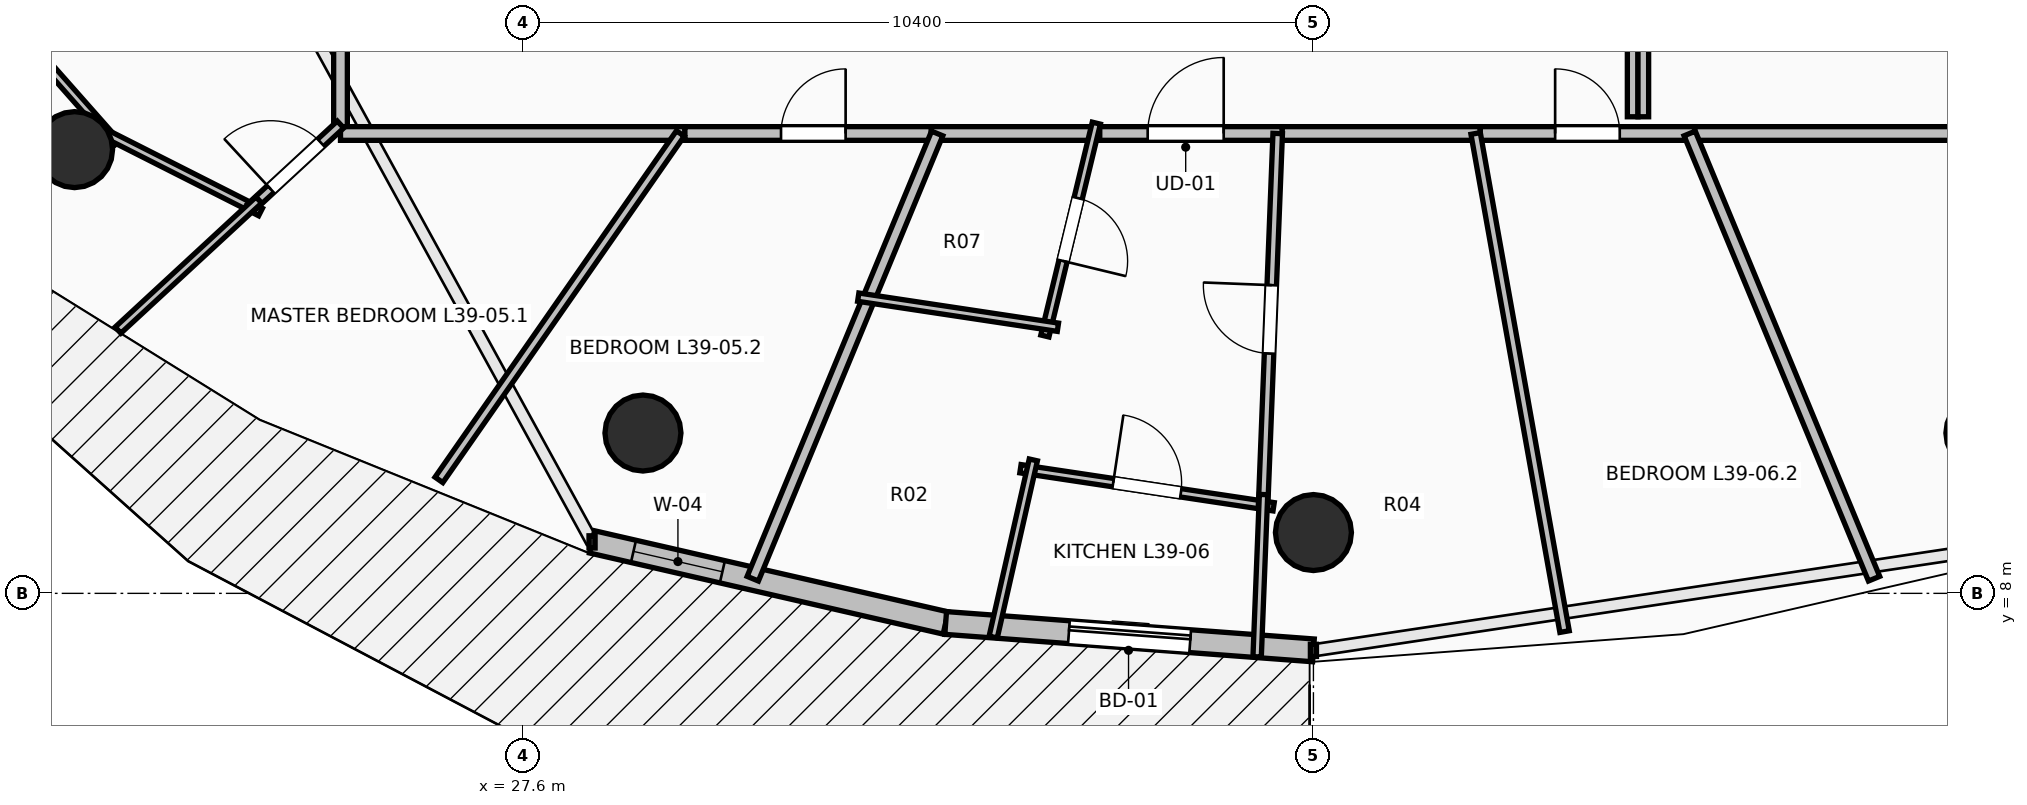
"""IFC4 building model, lengths in metres.
Left out: names, types, materials, properties, quantities, classifications, styles, units other than length and angle.
Written with IfcOpenShell. Run it as: python <this file> out.ifc"""

import sys

from ifc_helpers import new_model, si_unit, direction, frame, frame_2d, origin, origin_2d, place, context, subcontext, project, spatial, rectangle, circle, extrude, element, fill, save


model = new_model("IFC4")
c1 = context("Model", 3, precision=1e-05, world=origin(), true_north=direction((0.0, 1.0)))
c2 = subcontext(c1, "Body", "Model", "MODEL_VIEW")
j1 = project(units=[si_unit("LENGTHUNIT", "METRE"), si_unit("PLANEANGLEUNIT", "RADIAN")], contexts=[c1])
p1 = place(None, origin())
s1 = spatial("IfcSite", under=j1, at=p1, CompositionType="ELEMENT")
p2 = place(p1, origin())
s2 = spatial("IfcBuilding", under=s1, at=p2, CompositionType="ELEMENT")
p3 = place(p2, frame((0.0, 0.0, 146.6)))
s3 = spatial("IfcBuildingStorey", under=s2, at=p3, CompositionType="ELEMENT", Elevation=146.6)
for number, where, z_axis, x_axis in (
    (1, (21.701, 13.838, 0.0), (0.0, 0.0, 1.0), (-0.707, -0.707, 0.0)),
    (2, (29.179, 10.109, 0.0), (0.0, 0.0, 1.0), (-0.383, -0.924, 0.0)),
    (3, (38.0, 8.8, 0.0), (0.0, 0.0, 1.0), (0.0, -1.0, 0.0)),
    (4, (46.821, 10.109, 0.0), (0.0, 0.0, 1.0), (0.383, -0.924, 0.0)),
):
    element("IfcColumn", number, at=place(p3, frame(where, z_axis=z_axis, x_axis=x_axis)), inside=s3, PredefinedType="COLUMN", context=c2, shape_type="SweptSolid", body=[
        extrude(circle(Radius=0.5, at=origin_2d()), origin(), (0.0, 0.0, 1.0), 3.5),
    ])
p4 = place(p3, frame((28.51, 8.677, 0.0), z_axis=(0.0, 0.0, 1.0), x_axis=(0.974698897188, -0.223521944832, 0.0)))
e5 = element("IfcWall", 5, at=p4, inside=s3, PredefinedType="STANDARD", context=c2, shape_type="SweptSolid", body=[
    extrude(rectangle(XDim=4.773, YDim=0.3, at=frame_2d((2.387, 0.0))), origin(), (0.0, 0.0, 1.0), 3.24),
])
p5 = place(p4, frame((0.559, 0.0, 0.85)))
e6 = element("IfcOpeningElement", 6, at=p5, cuts=e5, PredefinedType="OPENING", context=c2, shape_type="SweptSolid", body=[
    extrude(rectangle(XDim=1.2, YDim=1.95, at=frame_2d((0.6, 0.975))), frame((0.0, 0.165, 0.0), z_axis=(0.0, -1.0, 0.0), x_axis=(1.0, 0.0, 0.0)), (0.0, 0.0, 1.0), 0.33),
])
p6 = place(p3, frame((33.162, 7.61, 0.0), z_axis=(0.0, 0.0, 1.0), x_axis=(0.997237740067, -0.074275768499, 0.0)))
e7 = element("IfcWall", 7, at=p6, inside=s3, PredefinedType="STANDARD", context=c2, shape_type="SweptSolid", body=[
    extrude(rectangle(XDim=4.852, YDim=0.3, at=frame_2d((2.426, 0.0))), origin(), (0.0, 0.0, 1.0), 3.24),
])
p7 = place(p6, frame((1.626, 0.0, 0.0)))
e8 = element("IfcOpeningElement", 8, at=p7, cuts=e7, PredefinedType="OPENING", context=c2, shape_type="SweptSolid", body=[
    extrude(rectangle(XDim=1.6, YDim=2.3, at=frame_2d((0.8, 1.15))), frame((0.0, 0.165, 0.0), z_axis=(0.0, -1.0, 0.0), x_axis=(1.0, 0.0, 0.0)), (0.0, 0.0, 1.0), 0.33),
])
p8 = place(p3, frame((25.2, 18.244, 0.0), z_axis=(0.0, 0.0, 1.0), x_axis=(0.0, -1.0, 0.0)))
e9 = element("IfcWall", 9, at=p8, inside=s3, PredefinedType="PARTITIONING", context=c2, shape_type="SweptSolid", body=[
    extrude(rectangle(XDim=4.158, YDim=0.18, at=frame_2d((2.079, 0.0))), origin(), (0.0, 0.0, 1.0), 2.432),
])
p9 = place(p8, frame((1.579, 0.0, 0.0)))
e10 = element("IfcOpeningElement", 10, at=p9, cuts=e9, PredefinedType="OPENING", context=c2, shape_type="SweptSolid", body=[
    extrude(rectangle(XDim=1.0, YDim=2.15, at=frame_2d((0.5, 1.075))), frame((0.0, 0.105, 0.0), z_axis=(0.0, -1.0, 0.0), x_axis=(1.0, 0.0, 0.0)), (0.0, 0.0, 1.0), 0.21),
])
p10 = place(p3, frame((25.2, 14.05, 0.0), z_axis=(0.0, 0.0, 1.0), x_axis=(1.0, 0.0, 0.0)))
e11 = element("IfcWall", 11, at=p10, inside=s3, PredefinedType="PARTITIONING", context=c2, shape_type="SweptSolid", body=[
    extrude(rectangle(XDim=4.531, YDim=0.18, at=frame_2d((2.266, 0.0))), origin(), (0.0, 0.0, 1.0), 2.432),
])
p11 = place(p3, frame((29.731, 14.05, 0.0), z_axis=(0.0, 0.0, 1.0), x_axis=(1.0, 0.0, 0.0)))
e12 = element("IfcWall", 12, at=p11, inside=s3, PredefinedType="PARTITIONING", context=c2, shape_type="SweptSolid", body=[
    extrude(rectangle(XDim=3.379, YDim=0.18, at=frame_2d((1.689, 0.0))), origin(), (0.0, 0.0, 1.0), 2.972),
])
p12 = place(p11, frame((1.264, 0.0, 0.0)))
e13 = element("IfcOpeningElement", 13, at=p12, cuts=e12, PredefinedType="OPENING", context=c2, shape_type="SweptSolid", body=[
    extrude(rectangle(XDim=0.85, YDim=2.1, at=frame_2d((0.425, 1.05))), frame((0.0, 0.105, 0.0), z_axis=(0.0, -1.0, 0.0), x_axis=(1.0, 0.0, 0.0)), (0.0, 0.0, 1.0), 0.21),
])
p13 = place(p3, frame((35.049, 14.05, 0.0), z_axis=(0.0, 0.0, 1.0), x_axis=(1.0, 0.0, 0.0)))
e14 = element("IfcWall", 14, at=p13, inside=s3, PredefinedType="PARTITIONING", context=c2, shape_type="SweptSolid", body=[
    extrude(rectangle(XDim=2.541, YDim=0.18, at=frame_2d((1.271, 0.0))), origin(), (0.0, 0.0, 1.0), 2.972),
])
p14 = place(p13, frame((0.771, 0.0, 0.0)))
e15 = element("IfcOpeningElement", 15, at=p14, cuts=e14, PredefinedType="OPENING", context=c2, shape_type="SweptSolid", body=[
    extrude(rectangle(XDim=1.0, YDim=2.15, at=frame_2d((0.5, 1.075))), frame((0.0, 0.105, 0.0), z_axis=(0.0, -1.0, 0.0), x_axis=(1.0, 0.0, 0.0)), (0.0, 0.0, 1.0), 0.21),
])
p15 = place(p3, frame((32.97, 14.05, 0.0), z_axis=(0.0, 0.0, 1.0), x_axis=(1.0, 0.0, 0.0)))
e16 = element("IfcWall", 16, at=p15, inside=s3, PredefinedType="PARTITIONING", context=c2, shape_type="SweptSolid", body=[
    extrude(rectangle(XDim=2.219, YDim=0.18, at=frame_2d((1.109, 0.0))), origin(), (0.0, 0.0, 1.0), 2.972),
])
p16 = place(p3, frame((37.59, 14.05, 0.0), z_axis=(0.0, 0.0, 1.0), x_axis=(1.0, 0.0, 0.0)))
e17 = element("IfcWall", 17, at=p16, inside=s3, PredefinedType="PARTITIONING", context=c2, shape_type="SweptSolid", body=[
    extrude(rectangle(XDim=2.605, YDim=0.18, at=frame_2d((1.302, 0.0))), origin(), (0.0, 0.0, 1.0), 2.972),
])
p17 = place(p3, frame((40.195, 14.05, 0.0), z_axis=(0.0, 0.0, 1.0), x_axis=(1.0, 0.0, 0.0)))
e18 = element("IfcWall", 18, at=p17, inside=s3, PredefinedType="PARTITIONING", context=c2, shape_type="SweptSolid", body=[
    extrude(rectangle(XDim=2.82, YDim=0.18, at=frame_2d((1.41, 0.0))), origin(), (0.0, 0.0, 1.0), 2.972),
])
p18 = place(p17, frame((0.985, 0.0, 0.0)))
e19 = element("IfcOpeningElement", 19, at=p18, cuts=e18, PredefinedType="OPENING", context=c2, shape_type="SweptSolid", body=[
    extrude(rectangle(XDim=0.85, YDim=2.1, at=frame_2d((0.425, 1.05))), frame((0.0, 0.105, 0.0), z_axis=(0.0, -1.0, 0.0), x_axis=(1.0, 0.0, 0.0)), (0.0, 0.0, 1.0), 0.21),
])
p19 = place(p3, frame((43.015, 14.05, 0.0), z_axis=(0.0, 0.0, 1.0), x_axis=(1.0, 0.0, 0.0)))
e20 = element("IfcWall", 20, at=p19, inside=s3, PredefinedType="PARTITIONING", context=c2, shape_type="SweptSolid", body=[
    extrude(rectangle(XDim=7.785, YDim=0.18, at=frame_2d((3.893, 0.0))), origin(), (0.0, 0.0, 1.0), 2.432),
])
p20 = place(p19, frame((3.393, 0.0, 0.0)))
e21 = element("IfcOpeningElement", 21, at=p20, cuts=e20, PredefinedType="OPENING", context=c2, shape_type="SweptSolid", body=[
    extrude(rectangle(XDim=1.0, YDim=2.15, at=frame_2d((0.5, 1.075))), frame((0.0, 0.105, 0.0), z_axis=(0.0, -1.0, 0.0), x_axis=(1.0, 0.0, 0.0)), (0.0, 0.0, 1.0), 0.21),
])
p21 = place(p3, frame((20.935, 15.409, 0.0), z_axis=(0.0, 0.0, 1.0), x_axis=(0.66216897397, -0.749354555542, 0.0)))
e22 = element("IfcWall", 22, at=p21, inside=s3, PredefinedType="PARTITIONING", context=c2, shape_type="SweptSolid", body=[
    extrude(rectangle(XDim=1.991, YDim=0.11, at=frame_2d((0.996, 0.0))), origin(), (0.0, 0.0, 1.0), 2.432),
])
p22 = place(p3, frame((22.036, 14.085, 0.0), z_axis=(0.0, 0.0, 1.0), x_axis=(0.892312874209, -0.451417472548, 0.0)))
e23 = element("IfcWall", 23, at=p22, inside=s3, PredefinedType="PARTITIONING", context=c2, shape_type="SweptSolid", body=[
    extrude(rectangle(XDim=2.367, YDim=0.11, at=frame_2d((1.183, 0.0))), origin(), (0.0, 0.0, 1.0), 2.432),
])
p23 = place(p3, frame((24.023, 13.08, 0.0), z_axis=(0.0, 0.0, 1.0), x_axis=(0.734359451791, 0.678760779336, 0.0)))
e24 = element("IfcWall", 24, at=p23, inside=s3, PredefinedType="PARTITIONING", context=c2, shape_type="SweptSolid", body=[
    extrude(rectangle(XDim=1.603, YDim=0.125, at=frame_2d((0.801, 0.0))), origin(), (0.0, 0.0, 1.0), 2.922),
])
p24 = place(p23, frame((0.351, 0.0, 0.0)))
e25 = element("IfcOpeningElement", 25, at=p24, cuts=e24, PredefinedType="OPENING", context=c2, shape_type="SweptSolid", body=[
    extrude(rectangle(XDim=0.9, YDim=2.1, at=frame_2d((0.45, 1.05))), frame((0.0, 0.077, 0.0), z_axis=(0.0, -1.0, 0.0), x_axis=(1.0, 0.0, 0.0)), (0.0, 0.0, 1.0), 0.155),
])
p25 = place(p3, frame((22.273, 11.463, 0.0), z_axis=(0.0, 0.0, 1.0), x_axis=(0.73438401738, 0.678734200565, 0.0)))
e26 = element("IfcWall", 26, at=p25, inside=s3, PredefinedType="PARTITIONING", context=c2, shape_type="SweptSolid", body=[
    extrude(rectangle(XDim=2.522, YDim=0.11, at=frame_2d((1.261, 0.0))), origin(), (0.0, 0.0, 1.0), 2.728),
])
p26 = place(p3, frame((26.495, 9.493, 0.0), z_axis=(0.0, 0.0, 1.0), x_axis=(0.571744252323, 0.820431904509, 0.0)))
e27 = element("IfcWall", 27, at=p26, inside=s3, PredefinedType="PARTITIONING", context=c2, shape_type="SweptSolid", body=[
    extrude(rectangle(XDim=5.554, YDim=0.125, at=frame_2d((2.777, 0.0))), origin(), (0.0, 0.0, 1.0), 2.432),
])
p27 = place(p3, frame((30.624, 8.193, 0.0), z_axis=(0.0, 0.0, 1.0), x_axis=(0.382683979298, 0.923879305964, 0.0)))
e28 = element("IfcWall", 28, at=p27, inside=s3, PredefinedType="PARTITIONING", context=c2, shape_type="SweptSolid", body=[
    extrude(rectangle(XDim=6.34, YDim=0.16, at=frame_2d((3.17, 0.0))), origin(), (0.0, 0.0, 1.0), 2.728),
])
p28 = place(p3, frame((35.144, 14.186, 0.0), z_axis=(0.0, 0.0, 1.0), x_axis=(-0.234930486238, -0.972012174119, 0.0)))
e29 = element("IfcWall", 29, at=p28, inside=s3, PredefinedType="PARTITIONING", context=c2, shape_type="SweptSolid", body=[
    extrude(rectangle(XDim=2.881, YDim=0.11, at=frame_2d((1.44, 0.0))), origin(), (0.0, 0.0, 1.0), 2.922),
])
p29 = place(p28, frame((1.015, 0.0, 0.0)))
e30 = element("IfcOpeningElement", 30, at=p29, cuts=e29, PredefinedType="OPENING", context=c2, shape_type="SweptSolid", body=[
    extrude(rectangle(XDim=0.85, YDim=2.1, at=frame_2d((0.425, 1.05))), frame((0.0, 0.07, 0.0), z_axis=(0.0, -1.0, 0.0), x_axis=(1.0, 0.0, 0.0)), (0.0, 0.0, 1.0), 0.14),
])
p30 = place(p3, frame((34.638, 11.501, 0.0), z_axis=(0.0, 0.0, 1.0), x_axis=(-0.988839741605, 0.148983104484, 0.0)))
e31 = element("IfcWall", 31, at=p30, inside=s3, PredefinedType="PARTITIONING", context=c2, shape_type="SweptSolid", body=[
    extrude(rectangle(XDim=2.656, YDim=0.11, at=frame_2d((1.328, 0.0))), origin(), (0.0, 0.0, 1.0), 3.24),
])
p31 = place(p3, frame((34.146, 9.64, 0.0), z_axis=(0.0, 0.0, 1.0), x_axis=(0.988887919082, -0.148662986296, 0.0)))
e32 = element("IfcWall", 32, at=p31, inside=s3, PredefinedType="PARTITIONING", context=c2, shape_type="SweptSolid", body=[
    extrude(rectangle(XDim=3.368, YDim=0.11, at=frame_2d((1.684, 0.0))), origin(), (0.0, 0.0, 1.0), 3.24),
])
p32 = place(p31, frame((1.234, 0.0, 0.0)))
e33 = element("IfcOpeningElement", 33, at=p32, cuts=e32, PredefinedType="OPENING", context=c2, shape_type="SweptSolid", body=[
    extrude(rectangle(XDim=0.9, YDim=2.1, at=frame_2d((0.45, 1.05))), frame((0.0, 0.07, 0.0), z_axis=(0.0, -1.0, 0.0), x_axis=(1.0, 0.0, 0.0)), (0.0, 0.0, 1.0), 0.14),
])
p33 = place(p3, frame((33.787, 7.426, 0.0), z_axis=(0.0, 0.0, 1.0), x_axis=(0.220932027223, 0.975289208054, 0.0)))
e34 = element("IfcWall", 34, at=p33, inside=s3, PredefinedType="PARTITIONING", context=c2, shape_type="SweptSolid", body=[
    extrude(rectangle(XDim=2.389, YDim=0.11, at=frame_2d((1.195, 0.0))), origin(), (0.0, 0.0, 1.0), 2.728),
])
p34 = place(p3, frame((37.338, 9.16, 0.0), z_axis=(0.0, 0.0, 1.0), x_axis=(0.039260769946, 0.99922899875, 0.0)))
e35 = element("IfcWall", 35, at=p34, inside=s3, PredefinedType="PARTITIONING", context=c2, shape_type="SweptSolid", body=[
    extrude(rectangle(XDim=4.894, YDim=0.125, at=frame_2d((2.447, 0.0))), origin(), (0.0, 0.0, 1.0), 2.922),
])
p35 = place(p34, frame((1.997, 0.0, 0.0)))
e36 = element("IfcOpeningElement", 36, at=p35, cuts=e35, PredefinedType="OPENING", context=c2, shape_type="SweptSolid", body=[
    extrude(rectangle(XDim=0.9, YDim=2.1, at=frame_2d((0.45, 1.05))), frame((0.0, 0.077, 0.0), z_axis=(0.0, -1.0, 0.0), x_axis=(1.0, 0.0, 0.0)), (0.0, 0.0, 1.0), 0.155),
])
p36 = place(p3, frame((37.26, 7.165, 0.0), z_axis=(0.0, 0.0, 1.0), x_axis=(0.039310852952, 0.999227029679, 0.0)))
e37 = element("IfcWall", 37, at=p36, inside=s3, PredefinedType="PARTITIONING", context=c2, shape_type="SweptSolid", body=[
    extrude(rectangle(XDim=2.136, YDim=0.11, at=frame_2d((1.068, 0.0))), origin(), (0.0, 0.0, 1.0), 2.728),
])
p37 = place(p3, frame((41.304, 7.497, 0.0), z_axis=(0.0, 0.0, 1.0), x_axis=(-0.175753825846, 0.984434148484, 0.0)))
e38 = element("IfcWall", 38, at=p37, inside=s3, PredefinedType="PARTITIONING", context=c2, shape_type="SweptSolid", body=[
    extrude(rectangle(XDim=6.656, YDim=0.125, at=frame_2d((3.328, 0.0))), origin(), (0.0, 0.0, 1.0), 2.432),
])
p38 = place(p3, frame((45.376, 8.193, 0.0), z_axis=(0.0, 0.0, 1.0), x_axis=(-0.382683979298, 0.923879305964, 0.0)))
e39 = element("IfcWall", 39, at=p38, inside=s3, PredefinedType="PARTITIONING", context=c2, shape_type="SweptSolid", body=[
    extrude(rectangle(XDim=6.34, YDim=0.16, at=frame_2d((3.17, 0.0))), origin(), (0.0, 0.0, 1.0), 2.432),
])
for number, where, z_axis, x_axis in (
    (40, (42.2, 16.1, 0.0), (0.0, 0.0, 1.0), (0.0, -1.0, 0.0)),
    (41, (42.34, 14.27, 0.0), (0.0, 0.0, 1.0), (0.0, 1.0, 0.0)),
):
    element("IfcWall", number, at=place(p3, frame(where, z_axis=z_axis, x_axis=x_axis)), inside=s3, PredefinedType="PARTITIONING", context=c2, shape_type="SweptSolid", body=[
        extrude(rectangle(XDim=1.83, YDim=0.14, at=frame_2d((0.915, 0.0))), origin(), (0.0, 0.0, 1.0), 3.24),
    ])
p39 = place(p7, origin())
e42 = element("IfcDoor", 42, at=p39, inside=s3, OperationType="SLIDING_TO_LEFT", PredefinedType="DOOR", context=c2, shape_type="SweptSolid", body=[
    extrude(rectangle(XDim=1.6, YDim=2.3, at=frame_2d((0.8, 1.15))), frame((0.0, 0.025, 0.0), z_axis=(0.0, -1.0, 0.0), x_axis=(1.0, 0.0, 0.0)), (0.0, 0.0, 1.0), 0.05),
])
fill(e8, e42)
p40 = place(p5, origin())
e43 = element("IfcWindow", 43, at=p40, inside=s3, PartitioningType="SINGLE_PANEL", PredefinedType="WINDOW", context=c2, shape_type="SweptSolid", body=[
    extrude(rectangle(XDim=1.2, YDim=1.95, at=frame_2d((0.6, 0.975))), frame((0.0, 0.03, 0.0), z_axis=(0.0, -1.0, 0.0), x_axis=(1.0, 0.0, 0.0)), (0.0, 0.0, 1.0), 0.06),
])
fill(e6, e43)
p41 = place(p14, origin())
e44 = element("IfcDoor", 44, at=p41, inside=s3, OperationType="SINGLE_SWING_RIGHT", PredefinedType="DOOR", context=c2, shape_type="SweptSolid", body=[
    extrude(rectangle(XDim=1.0, YDim=2.15, at=frame_2d((0.5, 1.075))), frame((0.0, 0.025, 0.0), z_axis=(0.0, -1.0, 0.0), x_axis=(1.0, 0.0, 0.0)), (0.0, 0.0, 1.0), 0.05),
])
fill(e15, e44)
p42 = place(p24, origin())
e45 = element("IfcDoor", 45, at=p42, inside=s3, OperationType="SINGLE_SWING_LEFT", PredefinedType="DOOR", context=c2, shape_type="SweptSolid", body=[
    extrude(rectangle(XDim=0.9, YDim=2.1, at=frame_2d((0.45, 1.05))), frame((0.0, 0.025, 0.0), z_axis=(0.0, -1.0, 0.0), x_axis=(1.0, 0.0, 0.0)), (0.0, 0.0, 1.0), 0.05),
])
fill(e25, e45)
p43 = place(p29, origin())
e46 = element("IfcDoor", 46, at=p43, inside=s3, OperationType="SINGLE_SWING_RIGHT", PredefinedType="DOOR", context=c2, shape_type="SweptSolid", body=[
    extrude(rectangle(XDim=0.85, YDim=2.1, at=frame_2d((0.425, 1.05))), frame((0.0, 0.025, 0.0), z_axis=(0.0, -1.0, 0.0), x_axis=(1.0, 0.0, 0.0)), (0.0, 0.0, 1.0), 0.05),
])
fill(e30, e46)
p44 = place(p32, origin())
e47 = element("IfcDoor", 47, at=p44, inside=s3, OperationType="SINGLE_SWING_LEFT", PredefinedType="DOOR", context=c2, shape_type="SweptSolid", body=[
    extrude(rectangle(XDim=0.9, YDim=2.1, at=frame_2d((0.45, 1.05))), frame((0.0, 0.025, 0.0), z_axis=(0.0, -1.0, 0.0), x_axis=(1.0, 0.0, 0.0)), (0.0, 0.0, 1.0), 0.05),
])
fill(e33, e47)
p45 = place(p35, origin())
e48 = element("IfcDoor", 48, at=p45, inside=s3, OperationType="SINGLE_SWING_RIGHT", PredefinedType="DOOR", context=c2, shape_type="SweptSolid", body=[
    extrude(rectangle(XDim=0.9, YDim=2.1, at=frame_2d((0.45, 1.05))), frame((0.0, 0.025, 0.0), z_axis=(0.0, -1.0, 0.0), x_axis=(1.0, 0.0, 0.0)), (0.0, 0.0, 1.0), 0.05),
])
fill(e36, e48)
p46 = place(p12, origin())
e49 = element("IfcDoor", 49, at=p46, inside=s3, OperationType="SINGLE_SWING_RIGHT", PredefinedType="DOOR", context=c2, shape_type="SweptSolid", body=[
    extrude(rectangle(XDim=0.85, YDim=2.1, at=frame_2d((0.425, 1.05))), frame((0.0, 0.025, 0.0), z_axis=(0.0, -1.0, 0.0), x_axis=(1.0, 0.0, 0.0)), (0.0, 0.0, 1.0), 0.05),
])
fill(e13, e49)
p47 = place(p18, origin())
e50 = element("IfcDoor", 50, at=p47, inside=s3, OperationType="SINGLE_SWING_LEFT", PredefinedType="DOOR", context=c2, shape_type="SweptSolid", body=[
    extrude(rectangle(XDim=0.85, YDim=2.1, at=frame_2d((0.425, 1.05))), frame((0.0, 0.025, 0.0), z_axis=(0.0, -1.0, 0.0), x_axis=(1.0, 0.0, 0.0)), (0.0, 0.0, 1.0), 0.05),
])
fill(e19, e50)
save(model, sys.argv[1])
